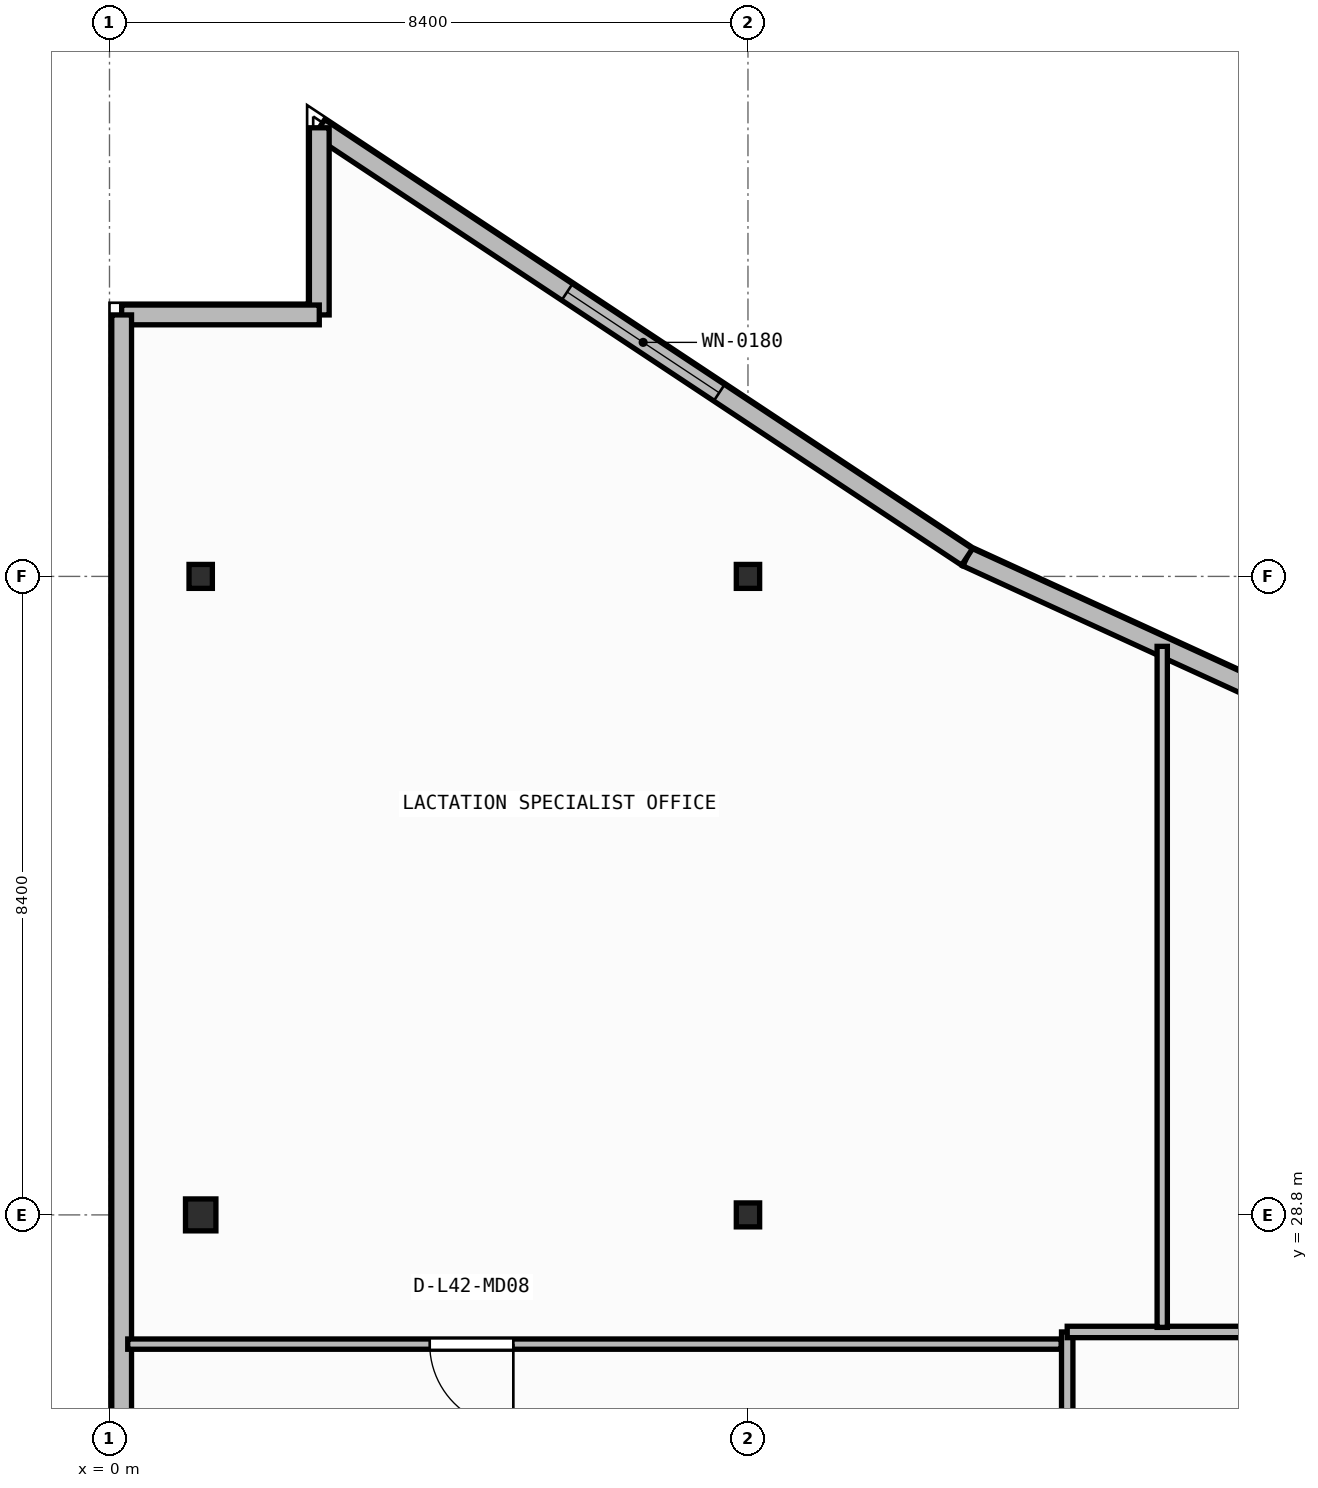
"""IFC4 building model, lengths in metres.
Left out: names, types, materials, properties, quantities, classifications, styles, units other than length and angle.
Written with IfcOpenShell. Run it as: python <this file> out.ifc"""

import sys

from ifc_helpers import new_model, si_unit, direction, frame, frame_2d, origin, origin_2d, place, context, subcontext, project, spatial, rectangle, i_section, extrude, element, fill, save


model = new_model("IFC4")
c1 = context("Model", 3, precision=1e-05, world=origin(), true_north=direction((0.0, 1.0)))
c2 = subcontext(c1, "Body", "Model", "MODEL_VIEW")
j1 = project(units=[si_unit("LENGTHUNIT", "METRE"), si_unit("PLANEANGLEUNIT", "RADIAN")], contexts=[c1])
p1 = place(None, origin())
s1 = spatial("IfcSite", under=j1, at=p1, CompositionType="ELEMENT")
p2 = place(p1, origin())
s2 = spatial("IfcBuilding", under=s1, at=p2, CompositionType="ELEMENT")
p3 = place(p2, frame((0.0, 0.0, 170.5)))
s3 = spatial("IfcBuildingStorey", under=s2, at=p3, CompositionType="ELEMENT", Elevation=170.5)
p4 = place(p3, frame((1.2, 28.8, 0.0), z_axis=(0.0, 0.0, 1.0), x_axis=(1.0, 0.0, 0.0)))
e1 = element("IfcColumn", 1, at=p4, inside=s3, PredefinedType="COLUMN", context=c2, shape_type="SweptSolid", body=[
    extrude(i_section(OverallWidth=0.4, OverallDepth=0.42, WebThickness=0.025, FlangeThickness=0.04, at=origin_2d()), origin(), (0.0, 0.0, 1.0), 3.95),
])
for number, where, z_axis, x_axis in (
    (2, (8.4, 28.8, 0.0), (0.0, 0.0, 1.0), (1.0, 0.0, 0.0)),
    (3, (1.2, 37.2, 0.0), (0.0, 0.0, 1.0), (1.0, 0.0, 0.0)),
    (4, (8.4, 37.2, 0.0), (0.0, 0.0, 1.0), (1.0, 0.0, 0.0)),
):
    element("IfcColumn", number, at=place(p3, frame(where, z_axis=z_axis, x_axis=x_axis)), inside=s3, PredefinedType="COLUMN", context=c2, shape_type="SweptSolid", body=[
        extrude(i_section(OverallWidth=0.307, OverallDepth=0.315, WebThickness=0.012, FlangeThickness=0.019, FilletRadius=0.017, at=origin_2d()), origin(), (0.0, 0.0, 1.0), 3.95),
    ])
p5 = place(p3, frame((23.818, 31.716, 0.0), z_axis=(0.0, 0.0, 1.0), x_axis=(-0.909209527513, 0.416338846471, 0.0)))
e5 = element("IfcWall", 5, at=p5, inside=s3, PredefinedType="STANDARD", context=c2, shape_type="SweptSolid", body=[
    extrude(rectangle(XDim=13.787, YDim=0.26, at=frame_2d((6.894, 0.0))), origin(), (0.0, 0.0, 1.0), 3.67),
])
p6 = place(p5, frame((5.694, 0.0, 0.9)))
e6 = element("IfcOpeningElement", 6, at=p6, cuts=e5, PredefinedType="OPENING", context=c2, shape_type="SweptSolid", body=[
    extrude(rectangle(XDim=2.4, YDim=1.65, at=frame_2d((1.2, 0.825))), frame((0.0, 0.14, 0.0), z_axis=(0.0, -1.0, 0.0), x_axis=(1.0, 0.0, 0.0)), (0.0, 0.0, 1.0), 0.28),
])
p7 = place(p3, frame((11.282, 37.456, 0.0), z_axis=(0.0, 0.0, 1.0), x_axis=(-0.833630474253, 0.552322580017, 0.0)))
e7 = element("IfcWall", 7, at=p7, inside=s3, PredefinedType="STANDARD", context=c2, shape_type="SweptSolid", body=[
    extrude(rectangle(XDim=10.223, YDim=0.26, at=frame_2d((5.111, 0.0))), origin(), (0.0, 0.0, 1.0), 3.67),
])
p8 = place(p7, frame((3.911, 0.0, 0.9)))
e8 = element("IfcOpeningElement", 8, at=p8, cuts=e7, PredefinedType="OPENING", context=c2, shape_type="SweptSolid", body=[
    extrude(rectangle(XDim=2.4, YDim=1.65, at=frame_2d((1.2, 0.825))), frame((0.0, 0.14, 0.0), z_axis=(0.0, -1.0, 0.0), x_axis=(1.0, 0.0, 0.0)), (0.0, 0.0, 1.0), 0.28),
])
p9 = place(p3, frame((2.76, 43.102, 0.0), z_axis=(0.0, 0.0, 1.0), x_axis=(0.0, -1.0, 0.0)))
e9 = element("IfcWall", 9, at=p9, inside=s3, PredefinedType="STANDARD", context=c2, shape_type="SweptSolid", body=[
    extrude(rectangle(XDim=2.462, YDim=0.26, at=frame_2d((1.231, 0.0))), origin(), (0.0, 0.0, 1.0), 3.67),
])
p10 = place(p3, frame((2.76, 40.64, 0.0), z_axis=(0.0, 0.0, 1.0), x_axis=(-1.0, 0.0, 0.0)))
e10 = element("IfcWall", 10, at=p10, inside=s3, PredefinedType="STANDARD", context=c2, shape_type="SweptSolid", body=[
    extrude(rectangle(XDim=2.6, YDim=0.26, at=frame_2d((1.3, 0.0))), origin(), (0.0, 0.0, 1.0), 3.67),
])
p11 = place(p3, frame((0.16, 40.64, 0.0), z_axis=(0.0, 0.0, 1.0), x_axis=(0.0, -1.0, 0.0)))
e11 = element("IfcWall", 11, at=p11, inside=s3, PredefinedType="STANDARD", context=c2, shape_type="SweptSolid", body=[
    extrude(rectangle(XDim=37.88, YDim=0.26, at=frame_2d((18.94, 0.0))), origin(), (0.0, 0.0, 1.0), 3.67),
])
p12 = place(p11, frame((27.37, 0.0, 0.9)))
e12 = element("IfcOpeningElement", 12, at=p12, cuts=e11, PredefinedType="OPENING", context=c2, shape_type="SweptSolid", body=[
    extrude(rectangle(XDim=2.4, YDim=1.65, at=frame_2d((1.2, 0.825))), frame((0.0, 0.14, 0.0), z_axis=(0.0, -1.0, 0.0), x_axis=(1.0, 0.0, 0.0)), (0.0, 0.0, 1.0), 0.28),
])
p13 = place(p3, frame((12.6, 27.26, 0.0), z_axis=(0.0, 0.0, 1.0), x_axis=(0.0, -1.0, 0.0)))
e13 = element("IfcWall", 13, at=p13, inside=s3, PredefinedType="PARTITIONING", context=c2, shape_type="SweptSolid", body=[
    extrude(rectangle(XDim=5.632, YDim=0.15, at=frame_2d((2.816, 0.0))), origin(), (0.0, 0.0, 1.0), 3.67),
])
p14 = place(p13, frame((2.266, 0.0, 0.0)))
e14 = element("IfcOpeningElement", 14, at=p14, cuts=e13, PredefinedType="OPENING", context=c2, shape_type="SweptSolid", body=[
    extrude(rectangle(XDim=1.1, YDim=2.1, at=frame_2d((0.55, 1.05))), frame((0.0, 0.085, 0.0), z_axis=(0.0, -1.0, 0.0), x_axis=(1.0, 0.0, 0.0)), (0.0, 0.0, 1.0), 0.17),
])
p15 = place(p3, frame((15.035, 27.26, 0.0), z_axis=(0.0, 0.0, 1.0), x_axis=(-1.0, 0.0, 0.0)))
e15 = element("IfcWall", 15, at=p15, inside=s3, PredefinedType="PARTITIONING", context=c2, shape_type="SweptSolid", body=[
    extrude(rectangle(XDim=2.435, YDim=0.15, at=frame_2d((1.217, 0.0))), origin(), (0.0, 0.0, 1.0), 3.67),
])
p16 = place(p3, frame((12.52, 27.1, 0.0), z_axis=(0.0, 0.0, 1.0), x_axis=(-1.0, 0.0, 0.0)))
e16 = element("IfcWall", 16, at=p16, inside=s3, PredefinedType="PARTITIONING", context=c2, shape_type="SweptSolid", body=[
    extrude(rectangle(XDim=12.28, YDim=0.135, at=frame_2d((6.14, 0.0))), origin(), (0.0, 0.0, 1.0), 3.67),
])
p17 = place(p16, frame((7.207, 0.0, 0.0)))
e17 = element("IfcOpeningElement", 17, at=p17, cuts=e16, PredefinedType="OPENING", context=c2, shape_type="SweptSolid", body=[
    extrude(rectangle(XDim=1.1, YDim=2.1, at=frame_2d((0.55, 1.05))), frame((0.0, 0.077, 0.0), z_axis=(0.0, -1.0, 0.0), x_axis=(1.0, 0.0, 0.0)), (0.0, 0.0, 1.0), 0.155),
])
p18 = place(p3, frame((13.85, 27.32, 0.0), z_axis=(0.0, 0.0, 1.0), x_axis=(0.0, 1.0, 0.0)))
e18 = element("IfcWall", 18, at=p18, inside=s3, PredefinedType="PARTITIONING", context=c2, shape_type="SweptSolid", body=[
    extrude(rectangle(XDim=8.96, YDim=0.135, at=frame_2d((4.48, 0.0))), origin(), (0.0, 0.0, 1.0), 3.67),
])
p19 = place(p8, origin())
e19 = element("IfcWindow", 19, at=p19, inside=s3, PartitioningType="SINGLE_PANEL", PredefinedType="WINDOW", context=c2, shape_type="SweptSolid", body=[
    extrude(rectangle(XDim=2.4, YDim=1.65, at=frame_2d((1.2, 0.825))), frame((0.0, 0.03, 0.0), z_axis=(0.0, -1.0, 0.0), x_axis=(1.0, 0.0, 0.0)), (0.0, 0.0, 1.0), 0.06),
])
fill(e8, e19)
p20 = place(p17, origin())
e20 = element("IfcDoor", 20, at=p20, inside=s3, OperationType="SINGLE_SWING_LEFT", PredefinedType="DOOR", context=c2, shape_type="SweptSolid", body=[
    extrude(rectangle(XDim=1.1, YDim=2.1, at=frame_2d((0.55, 1.05))), frame((0.0, 0.025, 0.0), z_axis=(0.0, -1.0, 0.0), x_axis=(1.0, 0.0, 0.0)), (0.0, 0.0, 1.0), 0.05),
])
fill(e17, e20)
save(model, sys.argv[1])
